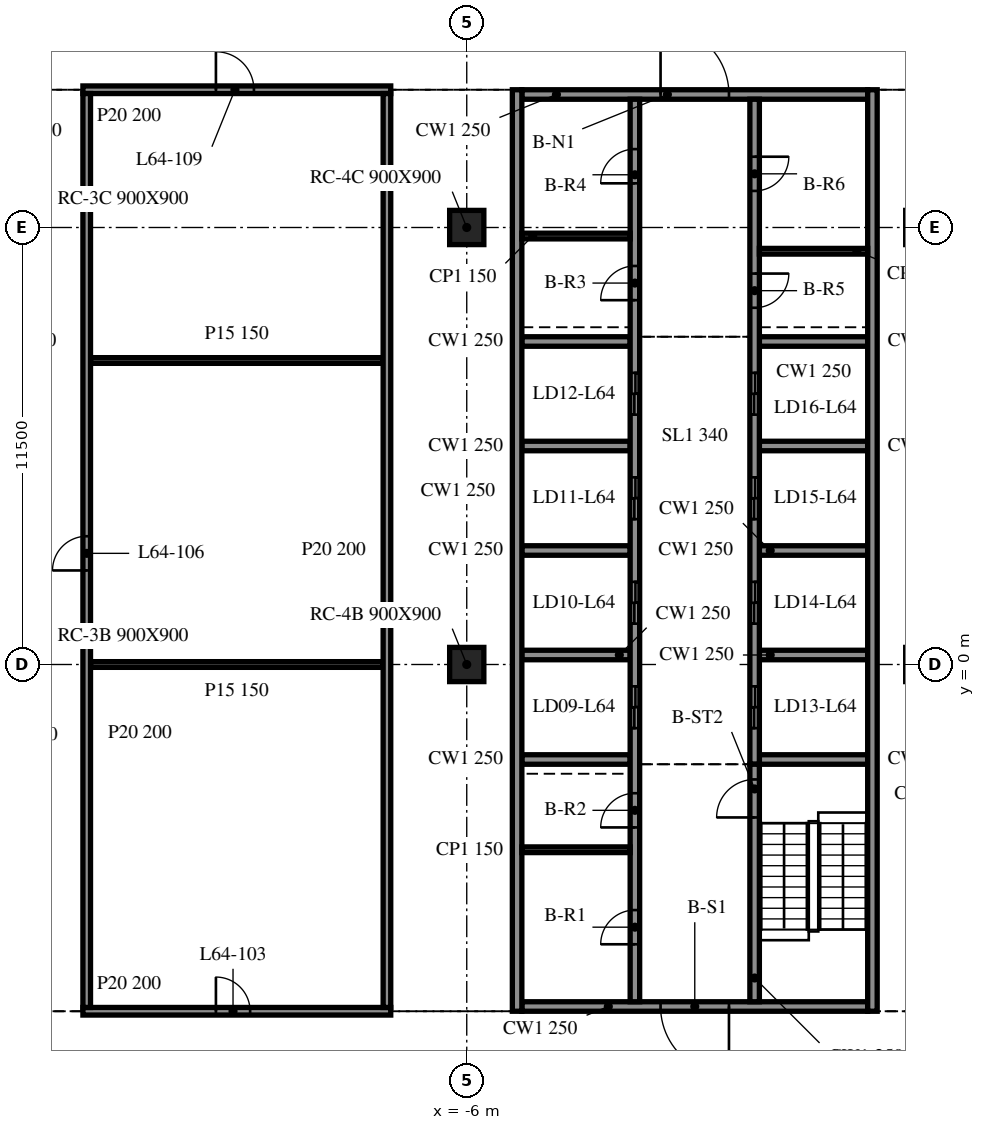
"""IFC4 building model, lengths in metres.
Left out: names, types, materials, properties, quantities, classifications, styles, units other than length and angle.
Written with IfcOpenShell. Run it as: python <this file> out.ifc"""

import sys

from ifc_helpers import new_model, si_unit, direction, frame, frame_2d, origin, origin_2d, place, context, subcontext, project, spatial, rectangle, extrude, element, fill, save


model = new_model("IFC4")
c1 = context("Model", 3, precision=1e-05, world=origin(), true_north=direction((0.0, 1.0)))
c2 = subcontext(c1, "Body", "Model", "MODEL_VIEW")
j1 = project(units=[si_unit("LENGTHUNIT", "METRE"), si_unit("PLANEANGLEUNIT", "RADIAN")], contexts=[c1])
p1 = place(None, origin())
s1 = spatial("IfcSite", under=j1, at=p1, CompositionType="ELEMENT")
p2 = place(p1, origin())
s2 = spatial("IfcBuilding", under=s1, at=p2, CompositionType="ELEMENT")
p3 = place(p2, frame((0.0, 0.0, 263.3)))
s3 = spatial("IfcBuildingStorey", under=s2, at=p3, CompositionType="ELEMENT", Elevation=263.3)
for number, where, z_axis, x_axis in (
    (1, (-6.0, 0.0, -0.34), (0.0, 0.0, 1.0), (1.0, 0.0, 0.0)),
    (2, (-6.0, 11.5, -0.34), (0.0, 0.0, 1.0), (1.0, 0.0, 0.0)),
):
    element("IfcColumn", number, at=place(p3, frame(where, z_axis=z_axis, x_axis=x_axis)), inside=s3, PredefinedType="COLUMN", context=c2, shape_type="SweptSolid", body=[
        extrude(rectangle(XDim=0.9, YDim=0.9, at=origin_2d()), origin(), (0.0, 0.0, 1.0), 3.8),
    ])
for number, where, z_axis, x_axis in (
    (3, (-4.675, 15.125, 0.0), (0.0, 0.0, 1.0), (0.0, -1.0, 0.0)),
    (4, (4.675, -9.125, 0.0), (0.0, 0.0, 1.0), (0.0, 1.0, 0.0)),
):
    element("IfcWall", number, at=place(p3, frame(where, z_axis=z_axis, x_axis=x_axis)), inside=s3, PredefinedType="SOLIDWALL", context=c2, shape_type="SweptSolid", body=[
        extrude(rectangle(XDim=24.25, YDim=0.25, at=frame_2d((12.125, 0.0))), origin(), (0.0, 0.0, 1.0), 3.46),
    ])
p4 = place(p3, frame((4.55, -9.0, 0.0), z_axis=(0.0, 0.0, 1.0), x_axis=(-1.0, 0.0, 0.0)))
e5 = element("IfcWall", 5, at=p4, inside=s3, PredefinedType="SOLIDWALL", context=c2, shape_type="SweptSolid", body=[
    extrude(rectangle(XDim=9.1, YDim=0.25, at=frame_2d((4.55, 0.0))), origin(), (0.0, 0.0, 1.0), 3.46),
])
p5 = place(p4, frame((3.65, 0.0, 0.0)))
e6 = element("IfcOpeningElement", 6, at=p5, cuts=e5, PredefinedType="OPENING", context=c2, shape_type="SweptSolid", body=[
    extrude(rectangle(XDim=1.8, YDim=2.1, at=frame_2d((0.9, 1.05))), frame((0.0, 0.135, 0.0), z_axis=(0.0, -1.0, 0.0), x_axis=(1.0, 0.0, 0.0)), (0.0, 0.0, 1.0), 0.27),
])
p6 = place(p3, frame((-4.55, 15.0, 0.0), z_axis=(0.0, 0.0, 1.0), x_axis=(1.0, 0.0, 0.0)))
e7 = element("IfcWall", 7, at=p6, inside=s3, PredefinedType="SOLIDWALL", context=c2, shape_type="SweptSolid", body=[
    extrude(rectangle(XDim=9.1, YDim=0.25, at=frame_2d((4.55, 0.0))), origin(), (0.0, 0.0, 1.0), 3.46),
])
p7 = place(p6, frame((3.65, 0.0, 0.0)))
e8 = element("IfcOpeningElement", 8, at=p7, cuts=e7, PredefinedType="OPENING", context=c2, shape_type="SweptSolid", body=[
    extrude(rectangle(XDim=1.8, YDim=2.1, at=frame_2d((0.9, 1.05))), frame((0.0, 0.135, 0.0), z_axis=(0.0, -1.0, 0.0), x_axis=(1.0, 0.0, 0.0)), (0.0, 0.0, 1.0), 0.27),
])
p8 = place(p3, frame((-1.575, -8.875, 0.0), z_axis=(0.0, 0.0, 1.0), x_axis=(0.0, 1.0, 0.0)))
e9 = element("IfcWall", 9, at=p8, inside=s3, PredefinedType="SOLIDWALL", context=c2, shape_type="SweptSolid", body=[
    extrude(rectangle(XDim=23.75, YDim=0.25, at=frame_2d((11.875, 0.0))), origin(), (0.0, 0.0, 1.0), 3.46),
])
p9 = place(p8, frame((7.2, 0.0, 0.0)))
e10 = element("IfcOpeningElement", 10, at=p9, cuts=e9, PredefinedType="OPENING", context=c2, shape_type="SweptSolid", body=[
    extrude(rectangle(XDim=1.1, YDim=2.1, at=frame_2d((0.55, 1.05))), frame((0.0, 0.135, 0.0), z_axis=(0.0, -1.0, 0.0), x_axis=(1.0, 0.0, 0.0)), (0.0, 0.0, 1.0), 0.27),
])
p10 = place(p8, frame((9.95, 0.0, 0.0)))
e11 = element("IfcOpeningElement", 11, at=p10, cuts=e9, PredefinedType="OPENING", context=c2, shape_type="SweptSolid", body=[
    extrude(rectangle(XDim=1.1, YDim=2.1, at=frame_2d((0.55, 1.05))), frame((0.0, 0.135, 0.0), z_axis=(0.0, -1.0, 0.0), x_axis=(1.0, 0.0, 0.0)), (0.0, 0.0, 1.0), 0.27),
])
p11 = place(p8, frame((12.7, 0.0, 0.0)))
e12 = element("IfcOpeningElement", 12, at=p11, cuts=e9, PredefinedType="OPENING", context=c2, shape_type="SweptSolid", body=[
    extrude(rectangle(XDim=1.1, YDim=2.1, at=frame_2d((0.55, 1.05))), frame((0.0, 0.135, 0.0), z_axis=(0.0, -1.0, 0.0), x_axis=(1.0, 0.0, 0.0)), (0.0, 0.0, 1.0), 0.27),
])
p12 = place(p8, frame((15.45, 0.0, 0.0)))
e13 = element("IfcOpeningElement", 13, at=p12, cuts=e9, PredefinedType="OPENING", context=c2, shape_type="SweptSolid", body=[
    extrude(rectangle(XDim=1.1, YDim=2.1, at=frame_2d((0.55, 1.05))), frame((0.0, 0.135, 0.0), z_axis=(0.0, -1.0, 0.0), x_axis=(1.0, 0.0, 0.0)), (0.0, 0.0, 1.0), 0.27),
])
p13 = place(p8, frame((1.512, 0.0, 0.0)))
e14 = element("IfcOpeningElement", 14, at=p13, cuts=e9, PredefinedType="OPENING", context=c2, shape_type="SweptSolid", body=[
    extrude(rectangle(XDim=0.9, YDim=2.1, at=frame_2d((0.45, 1.05))), frame((0.0, 0.135, 0.0), z_axis=(0.0, -1.0, 0.0), x_axis=(1.0, 0.0, 0.0)), (0.0, 0.0, 1.0), 0.27),
])
p14 = place(p8, frame((4.587, 0.0, 0.0)))
e15 = element("IfcOpeningElement", 15, at=p14, cuts=e9, PredefinedType="OPENING", context=c2, shape_type="SweptSolid", body=[
    extrude(rectangle(XDim=0.9, YDim=2.1, at=frame_2d((0.45, 1.05))), frame((0.0, 0.135, 0.0), z_axis=(0.0, -1.0, 0.0), x_axis=(1.0, 0.0, 0.0)), (0.0, 0.0, 1.0), 0.27),
])
p15 = place(p8, frame((18.462, 0.0, 0.0)))
e16 = element("IfcOpeningElement", 16, at=p15, cuts=e9, PredefinedType="OPENING", context=c2, shape_type="SweptSolid", body=[
    extrude(rectangle(XDim=0.9, YDim=2.1, at=frame_2d((0.45, 1.05))), frame((0.0, 0.135, 0.0), z_axis=(0.0, -1.0, 0.0), x_axis=(1.0, 0.0, 0.0)), (0.0, 0.0, 1.0), 0.27),
])
p16 = place(p8, frame((21.538, 0.0, 0.0)))
e17 = element("IfcOpeningElement", 17, at=p16, cuts=e9, PredefinedType="OPENING", context=c2, shape_type="SweptSolid", body=[
    extrude(rectangle(XDim=0.9, YDim=2.1, at=frame_2d((0.45, 1.05))), frame((0.0, 0.135, 0.0), z_axis=(0.0, -1.0, 0.0), x_axis=(1.0, 0.0, 0.0)), (0.0, 0.0, 1.0), 0.27),
])
p17 = place(p3, frame((1.575, -8.875, 0.0), z_axis=(0.0, 0.0, 1.0), x_axis=(0.0, 1.0, 0.0)))
e18 = element("IfcWall", 18, at=p17, inside=s3, PredefinedType="SOLIDWALL", context=c2, shape_type="SweptSolid", body=[
    extrude(rectangle(XDim=6.25, YDim=0.25, at=frame_2d((3.125, 0.0))), origin(), (0.0, 0.0, 1.0), 3.46),
])
p18 = place(p17, frame((4.85, 0.0, 0.0)))
e19 = element("IfcOpeningElement", 19, at=p18, cuts=e18, PredefinedType="OPENING", context=c2, shape_type="SweptSolid", body=[
    extrude(rectangle(XDim=1.0, YDim=2.1, at=frame_2d((0.5, 1.05))), frame((0.0, 0.135, 0.0), z_axis=(0.0, -1.0, 0.0), x_axis=(1.0, 0.0, 0.0)), (0.0, 0.0, 1.0), 0.27),
])
p19 = place(p3, frame((1.575, 14.875, 0.0), z_axis=(0.0, 0.0, 1.0), x_axis=(0.0, -1.0, 0.0)))
e20 = element("IfcWall", 20, at=p19, inside=s3, PredefinedType="SOLIDWALL", context=c2, shape_type="SweptSolid", body=[
    extrude(rectangle(XDim=17.5, YDim=0.25, at=frame_2d((8.75, 0.0))), origin(), (0.0, 0.0, 1.0), 3.46),
])
p20 = place(p19, frame((15.45, 0.0, 0.0)))
e21 = element("IfcOpeningElement", 21, at=p20, cuts=e20, PredefinedType="OPENING", context=c2, shape_type="SweptSolid", body=[
    extrude(rectangle(XDim=1.1, YDim=2.1, at=frame_2d((0.55, 1.05))), frame((0.0, 0.135, 0.0), z_axis=(0.0, -1.0, 0.0), x_axis=(1.0, 0.0, 0.0)), (0.0, 0.0, 1.0), 0.27),
])
p21 = place(p19, frame((12.7, 0.0, 0.0)))
e22 = element("IfcOpeningElement", 22, at=p21, cuts=e20, PredefinedType="OPENING", context=c2, shape_type="SweptSolid", body=[
    extrude(rectangle(XDim=1.1, YDim=2.1, at=frame_2d((0.55, 1.05))), frame((0.0, 0.135, 0.0), z_axis=(0.0, -1.0, 0.0), x_axis=(1.0, 0.0, 0.0)), (0.0, 0.0, 1.0), 0.27),
])
p22 = place(p19, frame((9.95, 0.0, 0.0)))
e23 = element("IfcOpeningElement", 23, at=p22, cuts=e20, PredefinedType="OPENING", context=c2, shape_type="SweptSolid", body=[
    extrude(rectangle(XDim=1.1, YDim=2.1, at=frame_2d((0.55, 1.05))), frame((0.0, 0.135, 0.0), z_axis=(0.0, -1.0, 0.0), x_axis=(1.0, 0.0, 0.0)), (0.0, 0.0, 1.0), 0.27),
])
p23 = place(p19, frame((7.2, 0.0, 0.0)))
e24 = element("IfcOpeningElement", 24, at=p23, cuts=e20, PredefinedType="OPENING", context=c2, shape_type="SweptSolid", body=[
    extrude(rectangle(XDim=1.1, YDim=2.1, at=frame_2d((0.55, 1.05))), frame((0.0, 0.135, 0.0), z_axis=(0.0, -1.0, 0.0), x_axis=(1.0, 0.0, 0.0)), (0.0, 0.0, 1.0), 0.27),
])
p24 = place(p19, frame((4.587, 0.0, 0.0)))
e25 = element("IfcOpeningElement", 25, at=p24, cuts=e20, PredefinedType="OPENING", context=c2, shape_type="SweptSolid", body=[
    extrude(rectangle(XDim=0.9, YDim=2.1, at=frame_2d((0.45, 1.05))), frame((0.0, 0.135, 0.0), z_axis=(0.0, -1.0, 0.0), x_axis=(1.0, 0.0, 0.0)), (0.0, 0.0, 1.0), 0.27),
])
p25 = place(p19, frame((1.512, 0.0, 0.0)))
e26 = element("IfcOpeningElement", 26, at=p25, cuts=e20, PredefinedType="OPENING", context=c2, shape_type="SweptSolid", body=[
    extrude(rectangle(XDim=0.9, YDim=2.1, at=frame_2d((0.45, 1.05))), frame((0.0, 0.135, 0.0), z_axis=(0.0, -1.0, 0.0), x_axis=(1.0, 0.0, 0.0)), (0.0, 0.0, 1.0), 0.27),
])
for number, where, z_axis, x_axis in (
    (27, (-4.55, -2.5, 0.0), (0.0, 0.0, 1.0), (1.0, 0.0, 0.0)),
    (28, (-4.55, 0.25, 0.0), (0.0, 0.0, 1.0), (1.0, 0.0, 0.0)),
    (29, (-4.55, 3.0, 0.0), (0.0, 0.0, 1.0), (1.0, 0.0, 0.0)),
    (30, (-4.55, 5.75, 0.0), (0.0, 0.0, 1.0), (1.0, 0.0, 0.0)),
    (31, (-4.55, 8.5, 0.0), (0.0, 0.0, 1.0), (1.0, 0.0, 0.0)),
    (32, (1.7, -2.5, 0.0), (0.0, 0.0, 1.0), (1.0, 0.0, 0.0)),
    (33, (1.7, 0.25, 0.0), (0.0, 0.0, 1.0), (1.0, 0.0, 0.0)),
    (34, (1.7, 3.0, 0.0), (0.0, 0.0, 1.0), (1.0, 0.0, 0.0)),
    (35, (1.7, 5.75, 0.0), (0.0, 0.0, 1.0), (1.0, 0.0, 0.0)),
    (36, (1.7, 8.5, 0.0), (0.0, 0.0, 1.0), (1.0, 0.0, 0.0)),
):
    element("IfcWall", number, at=place(p3, frame(where, z_axis=z_axis, x_axis=x_axis)), inside=s3, PredefinedType="SOLIDWALL", context=c2, shape_type="SweptSolid", body=[
        extrude(rectangle(XDim=2.85, YDim=0.25, at=frame_2d((1.425, 0.0))), origin(), (0.0, 0.0, 1.0), 3.46),
    ])
for number, where, z_axis, x_axis in (
    (37, (-4.55, -4.875, 0.0), (0.0, 0.0, 1.0), (1.0, 0.0, 0.0)),
    (38, (-4.55, 11.275, 0.0), (0.0, 0.0, 1.0), (1.0, 0.0, 0.0)),
    (39, (1.7, 10.875, 0.0), (0.0, 0.0, 1.0), (1.0, 0.0, 0.0)),
):
    element("IfcWall", number, at=place(p3, frame(where, z_axis=z_axis, x_axis=x_axis)), inside=s3, PredefinedType="PARTITIONING", context=c2, shape_type="SweptSolid", body=[
        extrude(rectangle(XDim=2.85, YDim=0.15, at=frame_2d((1.425, 0.0))), origin(), (0.0, 0.0, 1.0), 3.46),
    ])
p26 = place(p3, frame((-16.1, -9.125, 0.0), z_axis=(0.0, 0.0, 1.0), x_axis=(1.0, 0.0, 0.0)))
e40 = element("IfcWall", 40, at=p26, inside=s3, PredefinedType="PARTITIONING", context=c2, shape_type="SweptSolid", body=[
    extrude(rectangle(XDim=8.1, YDim=0.2, at=frame_2d((4.05, 0.0))), origin(), (0.0, 0.0, 1.0), 3.46),
])
p27 = place(p26, frame((3.5, 0.0, 0.0)))
e41 = element("IfcOpeningElement", 41, at=p27, cuts=e40, PredefinedType="OPENING", context=c2, shape_type="SweptSolid", body=[
    extrude(rectangle(XDim=0.9, YDim=2.1, at=frame_2d((0.45, 1.05))), frame((0.0, 0.11, 0.0), z_axis=(0.0, -1.0, 0.0), x_axis=(1.0, 0.0, 0.0)), (0.0, 0.0, 1.0), 0.22),
])
for number, where, z_axis, x_axis in (
    (42, (-15.9, 0.0, 0.0), (0.0, 0.0, 1.0), (1.0, 0.0, 0.0)),
    (43, (-15.9, 8.0, 0.0), (0.0, 0.0, 1.0), (1.0, 0.0, 0.0)),
):
    element("IfcWall", number, at=place(p3, frame(where, z_axis=z_axis, x_axis=x_axis)), inside=s3, PredefinedType="PARTITIONING", context=c2, shape_type="SweptSolid", body=[
        extrude(rectangle(XDim=7.7, YDim=0.15, at=frame_2d((3.85, 0.0))), origin(), (0.0, 0.0, 1.0), 3.46),
    ])
p28 = place(p3, frame((-16.1, 15.125, 0.0), z_axis=(0.0, 0.0, 1.0), x_axis=(1.0, 0.0, 0.0)))
e44 = element("IfcWall", 44, at=p28, inside=s3, PredefinedType="PARTITIONING", context=c2, shape_type="SweptSolid", body=[
    extrude(rectangle(XDim=8.1, YDim=0.2, at=frame_2d((4.05, 0.0))), origin(), (0.0, 0.0, 1.0), 3.46),
])
p29 = place(p28, frame((3.5, 0.0, 0.0)))
e45 = element("IfcOpeningElement", 45, at=p29, cuts=e44, PredefinedType="OPENING", context=c2, shape_type="SweptSolid", body=[
    extrude(rectangle(XDim=1.0, YDim=2.1, at=frame_2d((0.5, 1.05))), frame((0.0, 0.11, 0.0), z_axis=(0.0, -1.0, 0.0), x_axis=(1.0, 0.0, 0.0)), (0.0, 0.0, 1.0), 0.22),
])
p30 = place(p3, frame((-16.0, -9.025, 0.0), z_axis=(0.0, 0.0, 1.0), x_axis=(0.0, 1.0, 0.0)))
e46 = element("IfcWall", 46, at=p30, inside=s3, PredefinedType="PARTITIONING", context=c2, shape_type="SweptSolid", body=[
    extrude(rectangle(XDim=24.05, YDim=0.2, at=frame_2d((12.025, 0.0))), origin(), (0.0, 0.0, 1.0), 3.46),
])
p31 = place(p30, frame((11.5, 0.0, 0.0)))
e47 = element("IfcOpeningElement", 47, at=p31, cuts=e46, PredefinedType="OPENING", context=c2, shape_type="SweptSolid", body=[
    extrude(rectangle(XDim=0.9, YDim=2.1, at=frame_2d((0.45, 1.05))), frame((0.0, 0.11, 0.0), z_axis=(0.0, -1.0, 0.0), x_axis=(1.0, 0.0, 0.0)), (0.0, 0.0, 1.0), 0.22),
])
p32 = place(p3, frame((-8.1, -9.025, 0.0), z_axis=(0.0, 0.0, 1.0), x_axis=(0.0, 1.0, 0.0)))
e48 = element("IfcWall", 48, at=p32, inside=s3, PredefinedType="PARTITIONING", context=c2, shape_type="SweptSolid", body=[
    extrude(rectangle(XDim=24.05, YDim=0.2, at=frame_2d((12.025, 0.0))), origin(), (0.0, 0.0, 1.0), 3.46),
])
p33 = place(p5, origin())
e49 = element("IfcDoor", 49, at=p33, inside=s3, OperationType="DOUBLE_DOOR_SINGLE_SWING", PredefinedType="DOOR", context=c2, shape_type="SweptSolid", body=[
    extrude(rectangle(XDim=1.8, YDim=2.1, at=frame_2d((0.9, 1.05))), frame((0.0, 0.025, 0.0), z_axis=(0.0, -1.0, 0.0), x_axis=(1.0, 0.0, 0.0)), (0.0, 0.0, 1.0), 0.05),
])
fill(e6, e49)
p34 = place(p7, origin())
e50 = element("IfcDoor", 50, at=p34, inside=s3, OperationType="DOUBLE_DOOR_SINGLE_SWING", PredefinedType="DOOR", context=c2, shape_type="SweptSolid", body=[
    extrude(rectangle(XDim=1.8, YDim=2.1, at=frame_2d((0.9, 1.05))), frame((0.0, 0.025, 0.0), z_axis=(0.0, -1.0, 0.0), x_axis=(1.0, 0.0, 0.0)), (0.0, 0.0, 1.0), 0.05),
])
fill(e8, e50)
p35 = place(p20, origin())
e51 = element("IfcDoor", 51, at=p35, inside=s3, OperationType="DOUBLE_DOOR_SLIDING", PredefinedType="DOOR", context=c2, shape_type="SweptSolid", body=[
    extrude(rectangle(XDim=1.1, YDim=2.1, at=frame_2d((0.55, 1.05))), frame((0.0, 0.025, 0.0), z_axis=(0.0, -1.0, 0.0), x_axis=(1.0, 0.0, 0.0)), (0.0, 0.0, 1.0), 0.05),
])
fill(e21, e51)
p36 = place(p21, origin())
e52 = element("IfcDoor", 52, at=p36, inside=s3, OperationType="DOUBLE_DOOR_SLIDING", PredefinedType="DOOR", context=c2, shape_type="SweptSolid", body=[
    extrude(rectangle(XDim=1.1, YDim=2.1, at=frame_2d((0.55, 1.05))), frame((0.0, 0.025, 0.0), z_axis=(0.0, -1.0, 0.0), x_axis=(1.0, 0.0, 0.0)), (0.0, 0.0, 1.0), 0.05),
])
fill(e22, e52)
p37 = place(p22, origin())
e53 = element("IfcDoor", 53, at=p37, inside=s3, OperationType="DOUBLE_DOOR_SLIDING", PredefinedType="DOOR", context=c2, shape_type="SweptSolid", body=[
    extrude(rectangle(XDim=1.1, YDim=2.1, at=frame_2d((0.55, 1.05))), frame((0.0, 0.025, 0.0), z_axis=(0.0, -1.0, 0.0), x_axis=(1.0, 0.0, 0.0)), (0.0, 0.0, 1.0), 0.05),
])
fill(e23, e53)
p38 = place(p23, origin())
e54 = element("IfcDoor", 54, at=p38, inside=s3, OperationType="DOUBLE_DOOR_SLIDING", PredefinedType="DOOR", context=c2, shape_type="SweptSolid", body=[
    extrude(rectangle(XDim=1.1, YDim=2.1, at=frame_2d((0.55, 1.05))), frame((0.0, 0.025, 0.0), z_axis=(0.0, -1.0, 0.0), x_axis=(1.0, 0.0, 0.0)), (0.0, 0.0, 1.0), 0.05),
])
fill(e24, e54)
p39 = place(p9, origin())
e55 = element("IfcDoor", 55, at=p39, inside=s3, OperationType="DOUBLE_DOOR_SLIDING", PredefinedType="DOOR", context=c2, shape_type="SweptSolid", body=[
    extrude(rectangle(XDim=1.1, YDim=2.1, at=frame_2d((0.55, 1.05))), frame((0.0, 0.025, 0.0), z_axis=(0.0, -1.0, 0.0), x_axis=(1.0, 0.0, 0.0)), (0.0, 0.0, 1.0), 0.05),
])
fill(e10, e55)
p40 = place(p10, origin())
e56 = element("IfcDoor", 56, at=p40, inside=s3, OperationType="DOUBLE_DOOR_SLIDING", PredefinedType="DOOR", context=c2, shape_type="SweptSolid", body=[
    extrude(rectangle(XDim=1.1, YDim=2.1, at=frame_2d((0.55, 1.05))), frame((0.0, 0.025, 0.0), z_axis=(0.0, -1.0, 0.0), x_axis=(1.0, 0.0, 0.0)), (0.0, 0.0, 1.0), 0.05),
])
fill(e11, e56)
p41 = place(p11, origin())
e57 = element("IfcDoor", 57, at=p41, inside=s3, OperationType="DOUBLE_DOOR_SLIDING", PredefinedType="DOOR", context=c2, shape_type="SweptSolid", body=[
    extrude(rectangle(XDim=1.1, YDim=2.1, at=frame_2d((0.55, 1.05))), frame((0.0, 0.025, 0.0), z_axis=(0.0, -1.0, 0.0), x_axis=(1.0, 0.0, 0.0)), (0.0, 0.0, 1.0), 0.05),
])
fill(e12, e57)
p42 = place(p12, origin())
e58 = element("IfcDoor", 58, at=p42, inside=s3, OperationType="DOUBLE_DOOR_SLIDING", PredefinedType="DOOR", context=c2, shape_type="SweptSolid", body=[
    extrude(rectangle(XDim=1.1, YDim=2.1, at=frame_2d((0.55, 1.05))), frame((0.0, 0.025, 0.0), z_axis=(0.0, -1.0, 0.0), x_axis=(1.0, 0.0, 0.0)), (0.0, 0.0, 1.0), 0.05),
])
fill(e13, e58)
p43 = place(p13, origin())
e59 = element("IfcDoor", 59, at=p43, inside=s3, OperationType="SINGLE_SWING_LEFT", PredefinedType="DOOR", context=c2, shape_type="SweptSolid", body=[
    extrude(rectangle(XDim=0.9, YDim=2.1, at=frame_2d((0.45, 1.05))), frame((0.0, 0.025, 0.0), z_axis=(0.0, -1.0, 0.0), x_axis=(1.0, 0.0, 0.0)), (0.0, 0.0, 1.0), 0.05),
])
fill(e14, e59)
p44 = place(p14, origin())
e60 = element("IfcDoor", 60, at=p44, inside=s3, OperationType="SINGLE_SWING_RIGHT", PredefinedType="DOOR", context=c2, shape_type="SweptSolid", body=[
    extrude(rectangle(XDim=0.9, YDim=2.1, at=frame_2d((0.45, 1.05))), frame((0.0, 0.025, 0.0), z_axis=(0.0, -1.0, 0.0), x_axis=(1.0, 0.0, 0.0)), (0.0, 0.0, 1.0), 0.05),
])
fill(e15, e60)
p45 = place(p15, origin())
e61 = element("IfcDoor", 61, at=p45, inside=s3, OperationType="SINGLE_SWING_LEFT", PredefinedType="DOOR", context=c2, shape_type="SweptSolid", body=[
    extrude(rectangle(XDim=0.9, YDim=2.1, at=frame_2d((0.45, 1.05))), frame((0.0, 0.025, 0.0), z_axis=(0.0, -1.0, 0.0), x_axis=(1.0, 0.0, 0.0)), (0.0, 0.0, 1.0), 0.05),
])
fill(e16, e61)
p46 = place(p16, origin())
e62 = element("IfcDoor", 62, at=p46, inside=s3, OperationType="SINGLE_SWING_RIGHT", PredefinedType="DOOR", context=c2, shape_type="SweptSolid", body=[
    extrude(rectangle(XDim=0.9, YDim=2.1, at=frame_2d((0.45, 1.05))), frame((0.0, 0.025, 0.0), z_axis=(0.0, -1.0, 0.0), x_axis=(1.0, 0.0, 0.0)), (0.0, 0.0, 1.0), 0.05),
])
fill(e17, e62)
p47 = place(p24, origin())
e63 = element("IfcDoor", 63, at=p47, inside=s3, OperationType="SINGLE_SWING_LEFT", PredefinedType="DOOR", context=c2, shape_type="SweptSolid", body=[
    extrude(rectangle(XDim=0.9, YDim=2.1, at=frame_2d((0.45, 1.05))), frame((0.0, 0.025, 0.0), z_axis=(0.0, -1.0, 0.0), x_axis=(1.0, 0.0, 0.0)), (0.0, 0.0, 1.0), 0.05),
])
fill(e25, e63)
p48 = place(p25, origin())
e64 = element("IfcDoor", 64, at=p48, inside=s3, OperationType="SINGLE_SWING_RIGHT", PredefinedType="DOOR", context=c2, shape_type="SweptSolid", body=[
    extrude(rectangle(XDim=0.9, YDim=2.1, at=frame_2d((0.45, 1.05))), frame((0.0, 0.025, 0.0), z_axis=(0.0, -1.0, 0.0), x_axis=(1.0, 0.0, 0.0)), (0.0, 0.0, 1.0), 0.05),
])
fill(e26, e64)
p49 = place(p18, origin())
e65 = element("IfcDoor", 65, at=p49, inside=s3, OperationType="SINGLE_SWING_LEFT", PredefinedType="DOOR", context=c2, shape_type="SweptSolid", body=[
    extrude(rectangle(XDim=1.0, YDim=2.1, at=frame_2d((0.5, 1.05))), frame((0.0, 0.025, 0.0), z_axis=(0.0, -1.0, 0.0), x_axis=(1.0, 0.0, 0.0)), (0.0, 0.0, 1.0), 0.05),
])
fill(e19, e65)
p50 = place(p27, origin())
e66 = element("IfcDoor", 66, at=p50, inside=s3, OperationType="SINGLE_SWING_LEFT", PredefinedType="DOOR", context=c2, shape_type="SweptSolid", body=[
    extrude(rectangle(XDim=0.9, YDim=2.1, at=frame_2d((0.45, 1.05))), frame((0.0, 0.025, 0.0), z_axis=(0.0, -1.0, 0.0), x_axis=(1.0, 0.0, 0.0)), (0.0, 0.0, 1.0), 0.05),
])
fill(e41, e66)
p51 = place(p31, origin())
e67 = element("IfcDoor", 67, at=p51, inside=s3, OperationType="SINGLE_SWING_RIGHT", PredefinedType="DOOR", context=c2, shape_type="SweptSolid", body=[
    extrude(rectangle(XDim=0.9, YDim=2.1, at=frame_2d((0.45, 1.05))), frame((0.0, 0.025, 0.0), z_axis=(0.0, -1.0, 0.0), x_axis=(1.0, 0.0, 0.0)), (0.0, 0.0, 1.0), 0.05),
])
fill(e47, e67)
p52 = place(p29, origin())
e68 = element("IfcDoor", 68, at=p52, inside=s3, OperationType="SINGLE_SWING_RIGHT", PredefinedType="DOOR", context=c2, shape_type="SweptSolid", body=[
    extrude(rectangle(XDim=1.0, YDim=2.1, at=frame_2d((0.5, 1.05))), frame((0.0, 0.025, 0.0), z_axis=(0.0, -1.0, 0.0), x_axis=(1.0, 0.0, 0.0)), (0.0, 0.0, 1.0), 0.05),
])
fill(e45, e68)
save(model, sys.argv[1])
